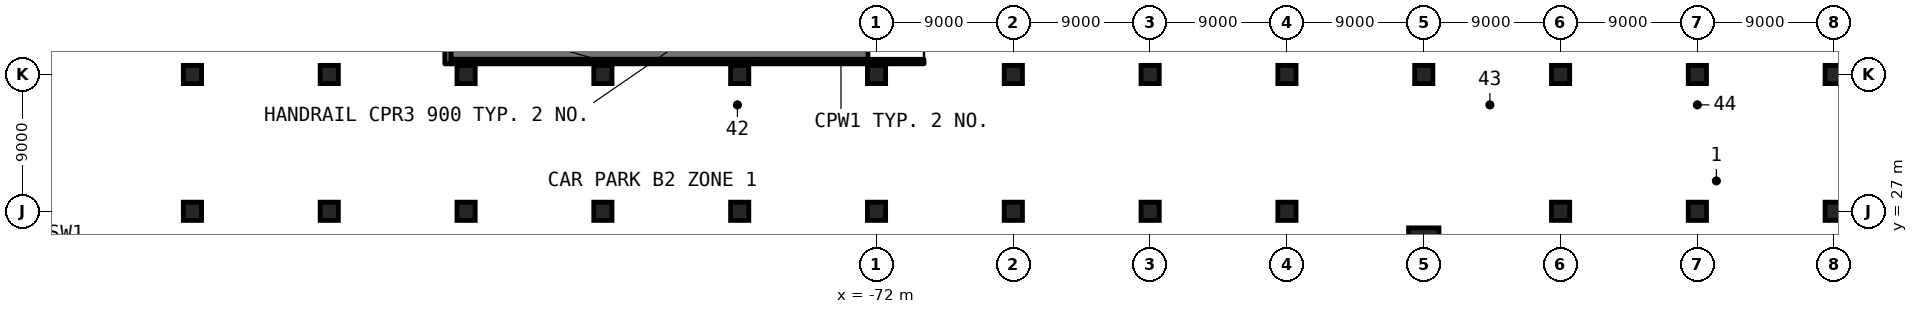
"""IFC4 building model, lengths in metres.
Left out: names, types, materials, properties, quantities, classifications, styles, units other than length and angle.
Written with IfcOpenShell. Run it as: python <this file> out.ifc"""

import sys

from ifc_helpers import new_model, si_unit, direction, frame, frame_2d, origin, origin_2d, place, context, subcontext, project, spatial, polyline, rectangle, outline, extrude, element, save


model = new_model("IFC4")
c1 = context("Model", 3, precision=1e-05, world=origin(), true_north=direction((0.0, 1.0)))
c2 = subcontext(c1, "Body", "Model", "MODEL_VIEW")
j1 = project(units=[si_unit("LENGTHUNIT", "METRE"), si_unit("PLANEANGLEUNIT", "RADIAN")], contexts=[c1])
p1 = place(None, origin())
s1 = spatial("IfcSite", under=j1, at=p1, CompositionType="ELEMENT")
p2 = place(p1, origin())
s2 = spatial("IfcBuilding", under=s1, at=p2, CompositionType="ELEMENT")
p3 = place(p2, frame((0.0, 0.0, -9.0)))
s3 = spatial("IfcBuildingStorey", under=s2, at=p3, CompositionType="ELEMENT", Elevation=-9.0)
for number, where, z_axis, x_axis in (
    (1, (-117.0, 27.0, 0.0), (0.0, 0.0, 1.0), (1.0, 0.0, 0.0)),
    (2, (-117.0, 36.0, 0.0), (0.0, 0.0, 1.0), (1.0, 0.0, 0.0)),
    (3, (-108.0, 27.0, 0.0), (0.0, 0.0, 1.0), (1.0, 0.0, 0.0)),
    (4, (-108.0, 36.0, 0.0), (0.0, 0.0, 1.0), (1.0, 0.0, 0.0)),
    (5, (-99.0, 27.0, 0.0), (0.0, 0.0, 1.0), (1.0, 0.0, 0.0)),
    (6, (-99.0, 36.0, 0.0), (0.0, 0.0, 1.0), (1.0, 0.0, 0.0)),
    (7, (-90.0, 27.0, 0.0), (0.0, 0.0, 1.0), (1.0, 0.0, 0.0)),
    (8, (-90.0, 36.0, 0.0), (0.0, 0.0, 1.0), (1.0, 0.0, 0.0)),
    (9, (-81.0, 27.0, 0.0), (0.0, 0.0, 1.0), (1.0, 0.0, 0.0)),
    (10, (-81.0, 36.0, 0.0), (0.0, 0.0, 1.0), (1.0, 0.0, 0.0)),
    (11, (-72.0, 27.0, 0.0), (0.0, 0.0, 1.0), (1.0, 0.0, 0.0)),
    (12, (-72.0, 36.0, 0.0), (0.0, 0.0, 1.0), (1.0, 0.0, 0.0)),
    (13, (-63.0, 27.0, 0.0), (0.0, 0.0, 1.0), (1.0, 0.0, 0.0)),
    (14, (-63.0, 36.0, 0.0), (0.0, 0.0, 1.0), (1.0, 0.0, 0.0)),
    (15, (-54.0, 27.0, 0.0), (0.0, 0.0, 1.0), (1.0, 0.0, 0.0)),
    (16, (-54.0, 36.0, 0.0), (0.0, 0.0, 1.0), (1.0, 0.0, 0.0)),
    (17, (-45.0, 27.0, 0.0), (0.0, 0.0, 1.0), (1.0, 0.0, 0.0)),
    (18, (-45.0, 36.0, 0.0), (0.0, 0.0, 1.0), (1.0, 0.0, 0.0)),
    (19, (-36.0, 36.0, 0.0), (0.0, 0.0, 1.0), (1.0, 0.0, 0.0)),
    (20, (-27.0, 27.0, 0.0), (0.0, 0.0, 1.0), (1.0, 0.0, 0.0)),
    (21, (-27.0, 36.0, 0.0), (0.0, 0.0, 1.0), (1.0, 0.0, 0.0)),
    (22, (-18.0, 27.0, 0.0), (0.0, 0.0, 1.0), (1.0, 0.0, 0.0)),
    (23, (-18.0, 36.0, 0.0), (0.0, 0.0, 1.0), (1.0, 0.0, 0.0)),
    (24, (-9.0, 27.0, 0.0), (0.0, 0.0, 1.0), (1.0, 0.0, 0.0)),
    (25, (-9.0, 36.0, 0.0), (0.0, 0.0, 1.0), (1.0, 0.0, 0.0)),
):
    element("IfcColumn", number, at=place(p3, frame(where, z_axis=z_axis, x_axis=x_axis)), inside=s3, PredefinedType="COLUMN", context=c2, shape_type="SweptSolid", body=[
        extrude(rectangle(XDim=1.2, YDim=1.2, at=origin_2d()), origin(), (0.0, 0.0, 1.0), 4.5),
    ])
p4 = place(p3, frame((-36.0, 24.91, 0.0), z_axis=(0.0, 0.0, 1.0), x_axis=(0.0, 1.0, 0.0)))
e26 = element("IfcColumn", 26, at=p4, inside=s3, PredefinedType="COLUMN", context=c2, shape_type="SweptSolid", body=[
    extrude(rectangle(XDim=2.0, YDim=2.0, at=origin_2d()), origin(), (0.0, 0.0, 1.0), 4.5),
])
p5 = place(p3, frame((-100.0, 40.5, 0.0), z_axis=(0.0, 0.0, 1.0), x_axis=(1.0, 0.0, 0.0)))
e27 = element("IfcWall", 27, at=p5, inside=s3, PredefinedType="SOLIDWALL", context=c2, shape_type="SweptSolid", body=[
    extrude(outline(polyline([(0.0, 0.0), (27.438, 0.0), (27.438, 0.05), (3.0, 3.96), (0.0, 4.2), (0.0, 0.0)])), frame((0.0, 3.5, 0.0), z_axis=(0.0, -1.0, 0.0), x_axis=(1.0, 0.0, 0.0)), (0.0, 0.0, 1.0), 7.0),
])
p6 = place(p3, frame((-100.0, 36.85, 0.0), z_axis=(0.0, 0.0, 1.0), x_axis=(1.0, 0.0, 0.0)))
e28 = element("IfcWall", 28, at=p6, inside=s3, PredefinedType="SOLIDWALL", context=c2, shape_type="SweptSolid", body=[
    extrude(rectangle(XDim=20.2, YDim=0.3, at=frame_2d((10.1, 0.0))), origin(), (0.0, 0.0, 1.0), 5.6),
])
p7 = place(p3, frame((-79.8, 36.85, 0.0), z_axis=(0.0, 0.0, 1.0), x_axis=(1.0, 0.0, 0.0)))
e29 = element("IfcWall", 29, at=p7, inside=s3, PredefinedType="SOLIDWALL", context=c2, shape_type="SweptSolid", body=[
    extrude(rectangle(XDim=10.925, YDim=0.3, at=frame_2d((5.462, 0.0))), origin(), (0.0, 0.0, 1.0), 4.1),
])
p8 = place(p3, frame((-100.2, 36.7, 0.0), z_axis=(0.0, 0.0, 1.0), x_axis=(0.0, 1.0, 0.0)))
e30 = element("IfcWall", 30, at=p8, inside=s3, PredefinedType="SOLIDWALL", context=c2, shape_type="SweptSolid", body=[
    extrude(rectangle(XDim=7.6, YDim=0.4, at=frame_2d((3.8, 0.0))), origin(), (0.0, 0.0, 1.0), 4.1),
])
save(model, sys.argv[1])
